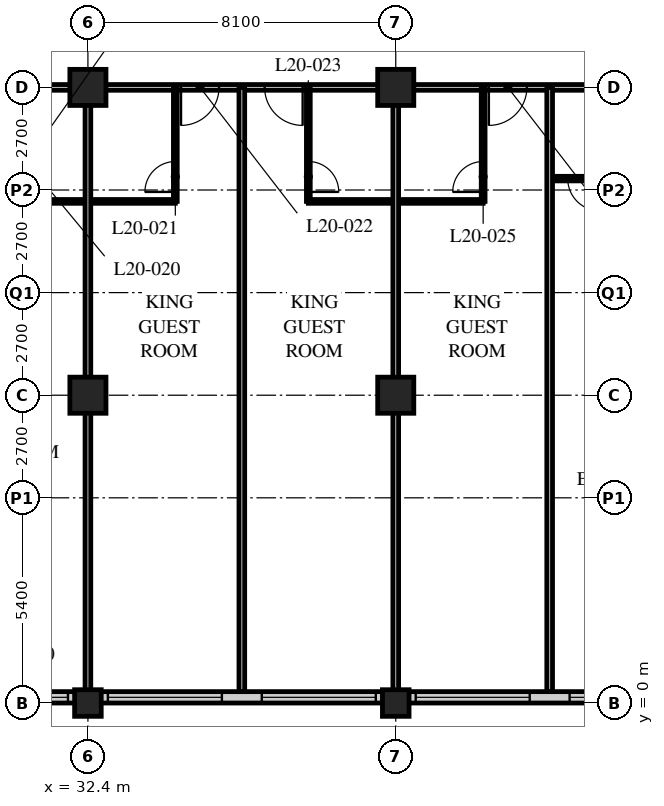
"""IFC4 building model, lengths in metres.
Left out: names, types, materials, properties, quantities, classifications, styles, units other than length and angle.
Written with IfcOpenShell. Run it as: python <this file> out.ifc"""

import sys

from ifc_helpers import new_model, si_unit, direction, frame, frame_2d, origin, origin_2d, place, context, subcontext, project, spatial, rectangle, hollow_rectangle, extrude, element, fill, save


model = new_model("IFC4")
c1 = context("Model", 3, precision=1e-05, world=origin(), true_north=direction((0.0, 1.0)))
c2 = subcontext(c1, "Body", "Model", "MODEL_VIEW")
j1 = project(units=[si_unit("LENGTHUNIT", "METRE"), si_unit("PLANEANGLEUNIT", "RADIAN")], contexts=[c1])
p1 = place(None, origin())
s1 = spatial("IfcSite", under=j1, at=p1, CompositionType="ELEMENT")
p2 = place(p1, origin())
s2 = spatial("IfcBuilding", under=s1, at=p2, CompositionType="ELEMENT")
p3 = place(p2, frame((0.0, 0.0, 80.6)))
s3 = spatial("IfcBuildingStorey", under=s2, at=p3, CompositionType="ELEMENT", Elevation=80.6)
p4 = place(p3, frame((32.4, 0.0, 0.0), z_axis=(0.0, 0.0, 1.0), x_axis=(1.0, 0.0, 0.0)))
e1 = element("IfcColumn", 1, at=p4, inside=s3, PredefinedType="COLUMN", context=c2, shape_type="SweptSolid", body=[
    extrude(hollow_rectangle(XDim=0.7, YDim=0.7, WallThickness=0.06, at=origin_2d()), origin(), (0.0, 0.0, 1.0), 3.4),
])
for number, where, z_axis, x_axis in (
    (2, (32.4, 8.1, 0.0), (0.0, 0.0, 1.0), (1.0, 0.0, 0.0)),
    (3, (32.4, 16.2, 0.0), (0.0, 0.0, 1.0), (1.0, 0.0, 0.0)),
):
    element("IfcColumn", number, at=place(p3, frame(where, z_axis=z_axis, x_axis=x_axis)), inside=s3, PredefinedType="COLUMN", context=c2, shape_type="SweptSolid", body=[
        extrude(hollow_rectangle(XDim=0.95, YDim=0.95, WallThickness=0.095, at=origin_2d()), origin(), (0.0, 0.0, 1.0), 3.4),
    ])
p5 = place(p3, frame((40.5, 0.0, 0.0), z_axis=(0.0, 0.0, 1.0), x_axis=(1.0, 0.0, 0.0)))
e4 = element("IfcColumn", 4, at=p5, inside=s3, PredefinedType="COLUMN", context=c2, shape_type="SweptSolid", body=[
    extrude(hollow_rectangle(XDim=0.7, YDim=0.7, WallThickness=0.06, at=origin_2d()), origin(), (0.0, 0.0, 1.0), 3.4),
])
for number, where, z_axis, x_axis in (
    (5, (40.5, 8.1, 0.0), (0.0, 0.0, 1.0), (1.0, 0.0, 0.0)),
    (6, (40.5, 16.2, 0.0), (0.0, 0.0, 1.0), (1.0, 0.0, 0.0)),
):
    element("IfcColumn", number, at=place(p3, frame(where, z_axis=z_axis, x_axis=x_axis)), inside=s3, PredefinedType="COLUMN", context=c2, shape_type="SweptSolid", body=[
        extrude(hollow_rectangle(XDim=0.95, YDim=0.95, WallThickness=0.095, at=origin_2d()), origin(), (0.0, 0.0, 1.0), 3.4),
    ])
p6 = place(p3, frame((8.4, 0.15, 0.0), z_axis=(0.0, 0.0, 1.0), x_axis=(1.0, 0.0, 0.0)))
e7 = element("IfcWall", 7, at=p6, inside=s3, PredefinedType="SOLIDWALL", context=c2, shape_type="SweptSolid", body=[
    extrude(rectangle(XDim=40.2, YDim=0.3, at=frame_2d((20.1, 0.0))), origin(), (0.0, 0.0, 1.0), 3.19),
])
p7 = place(p6, frame((0.225, 0.0, 0.9)))
e8 = element("IfcOpeningElement", 8, at=p7, cuts=e7, PredefinedType="OPENING", context=c2, shape_type="SweptSolid", body=[
    extrude(rectangle(XDim=3.0, YDim=1.5, at=frame_2d((1.5, 0.75))), frame((0.0, 0.16, 0.0), z_axis=(0.0, -1.0, 0.0), x_axis=(1.0, 0.0, 0.0)), (0.0, 0.0, 1.0), 0.32),
])
p8 = place(p6, frame((4.275, 0.0, 0.9)))
e9 = element("IfcOpeningElement", 9, at=p8, cuts=e7, PredefinedType="OPENING", context=c2, shape_type="SweptSolid", body=[
    extrude(rectangle(XDim=3.0, YDim=1.5, at=frame_2d((1.5, 0.75))), frame((0.0, 0.16, 0.0), z_axis=(0.0, -1.0, 0.0), x_axis=(1.0, 0.0, 0.0)), (0.0, 0.0, 1.0), 0.32),
])
p9 = place(p6, frame((8.325, 0.0, 0.9)))
e10 = element("IfcOpeningElement", 10, at=p9, cuts=e7, PredefinedType="OPENING", context=c2, shape_type="SweptSolid", body=[
    extrude(rectangle(XDim=3.0, YDim=1.5, at=frame_2d((1.5, 0.75))), frame((0.0, 0.16, 0.0), z_axis=(0.0, -1.0, 0.0), x_axis=(1.0, 0.0, 0.0)), (0.0, 0.0, 1.0), 0.32),
])
p10 = place(p6, frame((12.375, 0.0, 0.9)))
e11 = element("IfcOpeningElement", 11, at=p10, cuts=e7, PredefinedType="OPENING", context=c2, shape_type="SweptSolid", body=[
    extrude(rectangle(XDim=3.0, YDim=1.5, at=frame_2d((1.5, 0.75))), frame((0.0, 0.16, 0.0), z_axis=(0.0, -1.0, 0.0), x_axis=(1.0, 0.0, 0.0)), (0.0, 0.0, 1.0), 0.32),
])
p11 = place(p6, frame((16.425, 0.0, 0.9)))
e12 = element("IfcOpeningElement", 12, at=p11, cuts=e7, PredefinedType="OPENING", context=c2, shape_type="SweptSolid", body=[
    extrude(rectangle(XDim=3.0, YDim=1.5, at=frame_2d((1.5, 0.75))), frame((0.0, 0.16, 0.0), z_axis=(0.0, -1.0, 0.0), x_axis=(1.0, 0.0, 0.0)), (0.0, 0.0, 1.0), 0.32),
])
p12 = place(p6, frame((20.475, 0.0, 0.9)))
e13 = element("IfcOpeningElement", 13, at=p12, cuts=e7, PredefinedType="OPENING", context=c2, shape_type="SweptSolid", body=[
    extrude(rectangle(XDim=3.0, YDim=1.5, at=frame_2d((1.5, 0.75))), frame((0.0, 0.16, 0.0), z_axis=(0.0, -1.0, 0.0), x_axis=(1.0, 0.0, 0.0)), (0.0, 0.0, 1.0), 0.32),
])
p13 = place(p6, frame((24.525, 0.0, 0.9)))
e14 = element("IfcOpeningElement", 14, at=p13, cuts=e7, PredefinedType="OPENING", context=c2, shape_type="SweptSolid", body=[
    extrude(rectangle(XDim=3.0, YDim=1.5, at=frame_2d((1.5, 0.75))), frame((0.0, 0.16, 0.0), z_axis=(0.0, -1.0, 0.0), x_axis=(1.0, 0.0, 0.0)), (0.0, 0.0, 1.0), 0.32),
])
p14 = place(p6, frame((28.575, 0.0, 0.9)))
e15 = element("IfcOpeningElement", 15, at=p14, cuts=e7, PredefinedType="OPENING", context=c2, shape_type="SweptSolid", body=[
    extrude(rectangle(XDim=3.0, YDim=1.5, at=frame_2d((1.5, 0.75))), frame((0.0, 0.16, 0.0), z_axis=(0.0, -1.0, 0.0), x_axis=(1.0, 0.0, 0.0)), (0.0, 0.0, 1.0), 0.32),
])
p15 = place(p6, frame((32.625, 0.0, 0.9)))
e16 = element("IfcOpeningElement", 16, at=p15, cuts=e7, PredefinedType="OPENING", context=c2, shape_type="SweptSolid", body=[
    extrude(rectangle(XDim=3.0, YDim=1.5, at=frame_2d((1.5, 0.75))), frame((0.0, 0.16, 0.0), z_axis=(0.0, -1.0, 0.0), x_axis=(1.0, 0.0, 0.0)), (0.0, 0.0, 1.0), 0.32),
])
p16 = place(p6, frame((36.675, 0.0, 0.9)))
e17 = element("IfcOpeningElement", 17, at=p16, cuts=e7, PredefinedType="OPENING", context=c2, shape_type="SweptSolid", body=[
    extrude(rectangle(XDim=3.0, YDim=1.5, at=frame_2d((1.5, 0.75))), frame((0.0, 0.16, 0.0), z_axis=(0.0, -1.0, 0.0), x_axis=(1.0, 0.0, 0.0)), (0.0, 0.0, 1.0), 0.32),
])
p17 = place(p3, frame((12.15, 16.2, 0.0), z_axis=(0.0, 0.0, 1.0), x_axis=(1.0, 0.0, 0.0)))
e18 = element("IfcWall", 18, at=p17, inside=s3, PredefinedType="PARTITIONING", context=c2, shape_type="SweptSolid", body=[
    extrude(rectangle(XDim=36.45, YDim=0.15, at=frame_2d((18.225, 0.0))), origin(), (0.0, 0.0, 1.0), 2.428),
])
p18 = place(p17, frame((6.5, 0.0, 0.0)))
e19 = element("IfcOpeningElement", 19, at=p18, cuts=e18, PredefinedType="OPENING", context=c2, shape_type="SweptSolid", body=[
    extrude(rectangle(XDim=1.0, YDim=2.1, at=frame_2d((0.5, 1.05))), frame((0.0, 0.085, 0.0), z_axis=(0.0, -1.0, 0.0), x_axis=(1.0, 0.0, 0.0)), (0.0, 0.0, 1.0), 0.17),
])
p19 = place(p17, frame((8.4, 0.0, 0.0)))
e20 = element("IfcOpeningElement", 20, at=p19, cuts=e18, PredefinedType="OPENING", context=c2, shape_type="SweptSolid", body=[
    extrude(rectangle(XDim=1.0, YDim=2.1, at=frame_2d((0.5, 1.05))), frame((0.0, 0.085, 0.0), z_axis=(0.0, -1.0, 0.0), x_axis=(1.0, 0.0, 0.0)), (0.0, 0.0, 1.0), 0.17),
])
p20 = place(p17, frame((14.9, 0.0, 0.0)))
e21 = element("IfcOpeningElement", 21, at=p20, cuts=e18, PredefinedType="OPENING", context=c2, shape_type="SweptSolid", body=[
    extrude(rectangle(XDim=1.0, YDim=2.1, at=frame_2d((0.5, 1.05))), frame((0.0, 0.085, 0.0), z_axis=(0.0, -1.0, 0.0), x_axis=(1.0, 0.0, 0.0)), (0.0, 0.0, 1.0), 0.17),
])
p21 = place(p17, frame((16.5, 0.0, 0.0)))
e22 = element("IfcOpeningElement", 22, at=p21, cuts=e18, PredefinedType="OPENING", context=c2, shape_type="SweptSolid", body=[
    extrude(rectangle(XDim=1.0, YDim=2.1, at=frame_2d((0.5, 1.05))), frame((0.0, 0.085, 0.0), z_axis=(0.0, -1.0, 0.0), x_axis=(1.0, 0.0, 0.0)), (0.0, 0.0, 1.0), 0.17),
])
p22 = place(p17, frame((22.7, 0.0, 0.0)))
e23 = element("IfcOpeningElement", 23, at=p22, cuts=e18, PredefinedType="OPENING", context=c2, shape_type="SweptSolid", body=[
    extrude(rectangle(XDim=1.0, YDim=2.1, at=frame_2d((0.5, 1.05))), frame((0.0, 0.085, 0.0), z_axis=(0.0, -1.0, 0.0), x_axis=(1.0, 0.0, 0.0)), (0.0, 0.0, 1.0), 0.17),
])
p23 = place(p17, frame((24.9, 0.0, 0.0)))
e24 = element("IfcOpeningElement", 24, at=p23, cuts=e18, PredefinedType="OPENING", context=c2, shape_type="SweptSolid", body=[
    extrude(rectangle(XDim=1.0, YDim=2.1, at=frame_2d((0.5, 1.05))), frame((0.0, 0.085, 0.0), z_axis=(0.0, -1.0, 0.0), x_axis=(1.0, 0.0, 0.0)), (0.0, 0.0, 1.0), 0.17),
])
p24 = place(p17, frame((30.8, 0.0, 0.0)))
e25 = element("IfcOpeningElement", 25, at=p24, cuts=e18, PredefinedType="OPENING", context=c2, shape_type="SweptSolid", body=[
    extrude(rectangle(XDim=1.0, YDim=2.1, at=frame_2d((0.5, 1.05))), frame((0.0, 0.085, 0.0), z_axis=(0.0, -1.0, 0.0), x_axis=(1.0, 0.0, 0.0)), (0.0, 0.0, 1.0), 0.17),
])
p25 = place(p17, frame((1.525, 0.0, 0.0)))
e26 = element("IfcOpeningElement", 26, at=p25, cuts=e18, PredefinedType="OPENING", context=c2, shape_type="SweptSolid", body=[
    extrude(rectangle(XDim=1.0, YDim=2.1, at=frame_2d((0.5, 1.05))), frame((0.0, 0.085, 0.0), z_axis=(0.0, -1.0, 0.0), x_axis=(1.0, 0.0, 0.0)), (0.0, 0.0, 1.0), 0.17),
])
p26 = place(p17, frame((33.925, 0.0, 0.0)))
e27 = element("IfcOpeningElement", 27, at=p26, cuts=e18, PredefinedType="OPENING", context=c2, shape_type="SweptSolid", body=[
    extrude(rectangle(XDim=1.0, YDim=2.1, at=frame_2d((0.5, 1.05))), frame((0.0, 0.085, 0.0), z_axis=(0.0, -1.0, 0.0), x_axis=(1.0, 0.0, 0.0)), (0.0, 0.0, 1.0), 0.17),
])
p27 = place(p3, frame((29.8, 13.2, 0.0), z_axis=(0.0, 0.0, 1.0), x_axis=(1.0, 0.0, 0.0)))
e28 = element("IfcWall", 28, at=p27, inside=s3, PredefinedType="PARTITIONING", context=c2, shape_type="SweptSolid", body=[
    extrude(rectangle(XDim=4.9, YDim=0.1, at=frame_2d((2.45, 0.0))), origin(), (0.0, 0.0, 1.0), 3.19),
])
p28 = place(p3, frame((32.4, 16.2, 0.0), z_axis=(0.0, 0.0, 1.0), x_axis=(0.0, -1.0, 0.0)))
e29 = element("IfcWall", 29, at=p28, inside=s3, PredefinedType="PARTITIONING", context=c2, shape_type="SweptSolid", body=[
    extrude(rectangle(XDim=15.9, YDim=0.15, at=frame_2d((7.95, 0.0))), origin(), (0.0, 0.0, 1.0), 2.428),
])
p29 = place(p3, frame((34.7, 16.2, 0.0), z_axis=(0.0, 0.0, 1.0), x_axis=(0.0, -1.0, 0.0)))
e30 = element("IfcWall", 30, at=p29, inside=s3, PredefinedType="PARTITIONING", context=c2, shape_type="SweptSolid", body=[
    extrude(rectangle(XDim=3.0, YDim=0.1, at=frame_2d((1.5, 0.0))), origin(), (0.0, 0.0, 1.0), 3.19),
])
p30 = place(p29, frame((1.95, 0.0, 0.0)))
e31 = element("IfcOpeningElement", 31, at=p30, cuts=e30, PredefinedType="OPENING", context=c2, shape_type="SweptSolid", body=[
    extrude(rectangle(XDim=0.8, YDim=2.1, at=frame_2d((0.4, 1.05))), frame((0.0, 0.06, 0.0), z_axis=(0.0, -1.0, 0.0), x_axis=(1.0, 0.0, 0.0)), (0.0, 0.0, 1.0), 0.12),
])
p31 = place(p3, frame((36.45, 16.2, 0.0), z_axis=(0.0, 0.0, 1.0), x_axis=(0.0, -1.0, 0.0)))
e32 = element("IfcWall", 32, at=p31, inside=s3, PredefinedType="PARTITIONING", context=c2, shape_type="SweptSolid", body=[
    extrude(rectangle(XDim=15.9, YDim=0.15, at=frame_2d((7.95, 0.0))), origin(), (0.0, 0.0, 1.0), 3.19),
])
p32 = place(p3, frame((38.2, 13.2, 0.0), z_axis=(0.0, 0.0, 1.0), x_axis=(1.0, 0.0, 0.0)))
e33 = element("IfcWall", 33, at=p32, inside=s3, PredefinedType="PARTITIONING", context=c2, shape_type="SweptSolid", body=[
    extrude(rectangle(XDim=4.6, YDim=0.1, at=frame_2d((2.3, 0.0))), origin(), (0.0, 0.0, 1.0), 3.19),
])
p33 = place(p3, frame((38.2, 16.2, 0.0), z_axis=(0.0, 0.0, 1.0), x_axis=(0.0, -1.0, 0.0)))
e34 = element("IfcWall", 34, at=p33, inside=s3, PredefinedType="PARTITIONING", context=c2, shape_type="SweptSolid", body=[
    extrude(rectangle(XDim=3.0, YDim=0.1, at=frame_2d((1.5, 0.0))), origin(), (0.0, 0.0, 1.0), 3.19),
])
p34 = place(p33, frame((1.95, 0.0, 0.0)))
e35 = element("IfcOpeningElement", 35, at=p34, cuts=e34, PredefinedType="OPENING", context=c2, shape_type="SweptSolid", body=[
    extrude(rectangle(XDim=0.8, YDim=2.1, at=frame_2d((0.4, 1.05))), frame((0.0, 0.06, 0.0), z_axis=(0.0, -1.0, 0.0), x_axis=(1.0, 0.0, 0.0)), (0.0, 0.0, 1.0), 0.12),
])
p35 = place(p3, frame((40.5, 16.2, 0.0), z_axis=(0.0, 0.0, 1.0), x_axis=(0.0, -1.0, 0.0)))
e36 = element("IfcWall", 36, at=p35, inside=s3, PredefinedType="PARTITIONING", context=c2, shape_type="SweptSolid", body=[
    extrude(rectangle(XDim=15.9, YDim=0.15, at=frame_2d((7.95, 0.0))), origin(), (0.0, 0.0, 1.0), 2.428),
])
p36 = place(p3, frame((42.8, 16.2, 0.0), z_axis=(0.0, 0.0, 1.0), x_axis=(0.0, -1.0, 0.0)))
e37 = element("IfcWall", 37, at=p36, inside=s3, PredefinedType="PARTITIONING", context=c2, shape_type="SweptSolid", body=[
    extrude(rectangle(XDim=3.0, YDim=0.1, at=frame_2d((1.5, 0.0))), origin(), (0.0, 0.0, 1.0), 3.19),
])
p37 = place(p36, frame((1.95, 0.0, 0.0)))
e38 = element("IfcOpeningElement", 38, at=p37, cuts=e37, PredefinedType="OPENING", context=c2, shape_type="SweptSolid", body=[
    extrude(rectangle(XDim=0.8, YDim=2.1, at=frame_2d((0.4, 1.05))), frame((0.0, 0.06, 0.0), z_axis=(0.0, -1.0, 0.0), x_axis=(1.0, 0.0, 0.0)), (0.0, 0.0, 1.0), 0.12),
])
p38 = place(p3, frame((44.55, 13.8, 0.0), z_axis=(0.0, 0.0, 1.0), x_axis=(1.0, 0.0, 0.0)))
e39 = element("IfcWall", 39, at=p38, inside=s3, PredefinedType="PARTITIONING", context=c2, shape_type="SweptSolid", body=[
    extrude(rectangle(XDim=8.05, YDim=0.12, at=frame_2d((4.025, 0.0))), origin(), (0.0, 0.0, 1.0), 3.19),
])
p39 = place(p38, frame((0.475, 0.0, 0.0)))
e40 = element("IfcOpeningElement", 40, at=p39, cuts=e39, PredefinedType="OPENING", context=c2, shape_type="SweptSolid", body=[
    extrude(rectangle(XDim=0.85, YDim=2.1, at=frame_2d((0.425, 1.05))), frame((0.0, 0.07, 0.0), z_axis=(0.0, -1.0, 0.0), x_axis=(1.0, 0.0, 0.0)), (0.0, 0.0, 1.0), 0.14),
])
p40 = place(p38, frame((4.325, 0.0, 0.0)))
e41 = element("IfcOpeningElement", 41, at=p40, cuts=e39, PredefinedType="OPENING", context=c2, shape_type="SweptSolid", body=[
    extrude(rectangle(XDim=0.85, YDim=2.1, at=frame_2d((0.425, 1.05))), frame((0.0, 0.07, 0.0), z_axis=(0.0, -1.0, 0.0), x_axis=(1.0, 0.0, 0.0)), (0.0, 0.0, 1.0), 0.14),
])
p41 = place(p3, frame((44.55, 16.2, 0.0), z_axis=(0.0, 0.0, 1.0), x_axis=(0.0, -1.0, 0.0)))
e42 = element("IfcWall", 42, at=p41, inside=s3, PredefinedType="PARTITIONING", context=c2, shape_type="SweptSolid", body=[
    extrude(rectangle(XDim=15.9, YDim=0.15, at=frame_2d((7.95, 0.0))), origin(), (0.0, 0.0, 1.0), 3.19),
])
p42 = place(p12, origin())
e43 = element("IfcWindow", 43, at=p42, inside=s3, PartitioningType="SINGLE_PANEL", PredefinedType="WINDOW", context=c2, shape_type="SweptSolid", body=[
    extrude(rectangle(XDim=3.0, YDim=1.5, at=frame_2d((1.5, 0.75))), frame((0.0, 0.03, 0.0), z_axis=(0.0, -1.0, 0.0), x_axis=(1.0, 0.0, 0.0)), (0.0, 0.0, 1.0), 0.06),
])
fill(e13, e43)
p43 = place(p13, origin())
e44 = element("IfcWindow", 44, at=p43, inside=s3, PartitioningType="SINGLE_PANEL", PredefinedType="WINDOW", context=c2, shape_type="SweptSolid", body=[
    extrude(rectangle(XDim=3.0, YDim=1.5, at=frame_2d((1.5, 0.75))), frame((0.0, 0.03, 0.0), z_axis=(0.0, -1.0, 0.0), x_axis=(1.0, 0.0, 0.0)), (0.0, 0.0, 1.0), 0.06),
])
fill(e14, e44)
p44 = place(p14, origin())
e45 = element("IfcWindow", 45, at=p44, inside=s3, PartitioningType="SINGLE_PANEL", PredefinedType="WINDOW", context=c2, shape_type="SweptSolid", body=[
    extrude(rectangle(XDim=3.0, YDim=1.5, at=frame_2d((1.5, 0.75))), frame((0.0, 0.03, 0.0), z_axis=(0.0, -1.0, 0.0), x_axis=(1.0, 0.0, 0.0)), (0.0, 0.0, 1.0), 0.06),
])
fill(e15, e45)
p45 = place(p15, origin())
e46 = element("IfcWindow", 46, at=p45, inside=s3, PartitioningType="SINGLE_PANEL", PredefinedType="WINDOW", context=c2, shape_type="SweptSolid", body=[
    extrude(rectangle(XDim=3.0, YDim=1.5, at=frame_2d((1.5, 0.75))), frame((0.0, 0.03, 0.0), z_axis=(0.0, -1.0, 0.0), x_axis=(1.0, 0.0, 0.0)), (0.0, 0.0, 1.0), 0.06),
])
fill(e16, e46)
p46 = place(p16, origin())
e47 = element("IfcWindow", 47, at=p46, inside=s3, PartitioningType="SINGLE_PANEL", PredefinedType="WINDOW", context=c2, shape_type="SweptSolid", body=[
    extrude(rectangle(XDim=3.0, YDim=1.5, at=frame_2d((1.5, 0.75))), frame((0.0, 0.03, 0.0), z_axis=(0.0, -1.0, 0.0), x_axis=(1.0, 0.0, 0.0)), (0.0, 0.0, 1.0), 0.06),
])
fill(e17, e47)
p47 = place(p30, origin())
e48 = element("IfcDoor", 48, at=p47, inside=s3, OperationType="SINGLE_SWING_LEFT", PredefinedType="DOOR", context=c2, shape_type="SweptSolid", body=[
    extrude(rectangle(XDim=0.8, YDim=2.1, at=frame_2d((0.4, 1.05))), frame((0.0, 0.025, 0.0), z_axis=(0.0, -1.0, 0.0), x_axis=(1.0, 0.0, 0.0)), (0.0, 0.0, 1.0), 0.05),
])
fill(e31, e48)
p48 = place(p22, origin())
e49 = element("IfcDoor", 49, at=p48, inside=s3, OperationType="SINGLE_SWING_RIGHT", PredefinedType="DOOR", context=c2, shape_type="SweptSolid", body=[
    extrude(rectangle(XDim=1.0, YDim=2.1, at=frame_2d((0.5, 1.05))), frame((0.0, 0.025, 0.0), z_axis=(0.0, -1.0, 0.0), x_axis=(1.0, 0.0, 0.0)), (0.0, 0.0, 1.0), 0.05),
])
fill(e23, e49)
p49 = place(p34, origin())
e50 = element("IfcDoor", 50, at=p49, inside=s3, OperationType="SINGLE_SWING_RIGHT", PredefinedType="DOOR", context=c2, shape_type="SweptSolid", body=[
    extrude(rectangle(XDim=0.8, YDim=2.1, at=frame_2d((0.4, 1.05))), frame((0.0, 0.025, 0.0), z_axis=(0.0, -1.0, 0.0), x_axis=(1.0, 0.0, 0.0)), (0.0, 0.0, 1.0), 0.05),
])
fill(e35, e50)
p50 = place(p23, origin())
e51 = element("IfcDoor", 51, at=p50, inside=s3, OperationType="SINGLE_SWING_LEFT", PredefinedType="DOOR", context=c2, shape_type="SweptSolid", body=[
    extrude(rectangle(XDim=1.0, YDim=2.1, at=frame_2d((0.5, 1.05))), frame((0.0, 0.025, 0.0), z_axis=(0.0, -1.0, 0.0), x_axis=(1.0, 0.0, 0.0)), (0.0, 0.0, 1.0), 0.05),
])
fill(e24, e51)
p51 = place(p37, origin())
e52 = element("IfcDoor", 52, at=p51, inside=s3, OperationType="SINGLE_SWING_LEFT", PredefinedType="DOOR", context=c2, shape_type="SweptSolid", body=[
    extrude(rectangle(XDim=0.8, YDim=2.1, at=frame_2d((0.4, 1.05))), frame((0.0, 0.025, 0.0), z_axis=(0.0, -1.0, 0.0), x_axis=(1.0, 0.0, 0.0)), (0.0, 0.0, 1.0), 0.05),
])
fill(e38, e52)
p52 = place(p24, origin())
e53 = element("IfcDoor", 53, at=p52, inside=s3, OperationType="SINGLE_SWING_RIGHT", PredefinedType="DOOR", context=c2, shape_type="SweptSolid", body=[
    extrude(rectangle(XDim=1.0, YDim=2.1, at=frame_2d((0.5, 1.05))), frame((0.0, 0.025, 0.0), z_axis=(0.0, -1.0, 0.0), x_axis=(1.0, 0.0, 0.0)), (0.0, 0.0, 1.0), 0.05),
])
fill(e25, e53)
p53 = place(p39, origin())
e54 = element("IfcDoor", 54, at=p53, inside=s3, OperationType="SINGLE_SWING_LEFT", PredefinedType="DOOR", context=c2, shape_type="SweptSolid", body=[
    extrude(rectangle(XDim=0.85, YDim=2.1, at=frame_2d((0.425, 1.05))), frame((0.0, 0.025, 0.0), z_axis=(0.0, -1.0, 0.0), x_axis=(1.0, 0.0, 0.0)), (0.0, 0.0, 1.0), 0.05),
])
fill(e40, e54)
save(model, sys.argv[1])
